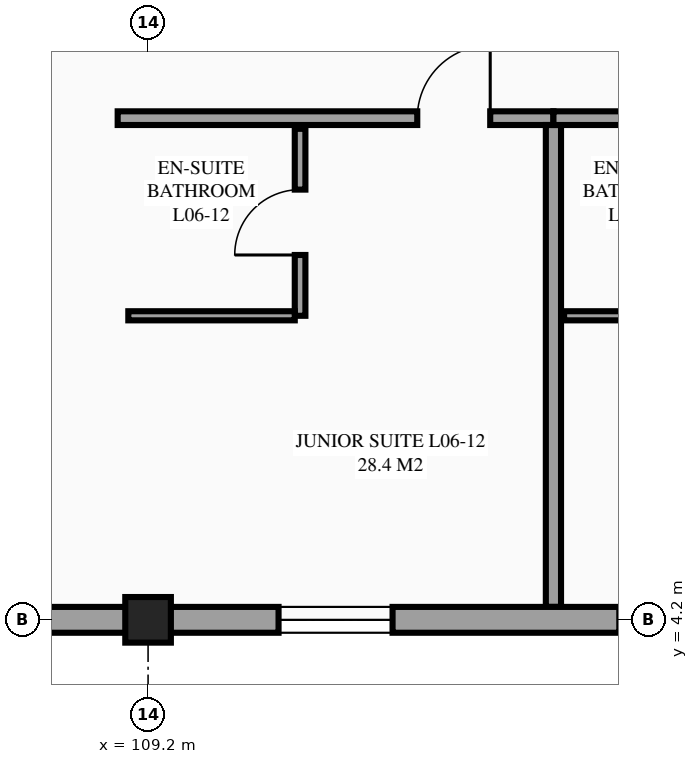
"""IFC4 building model, lengths in metres.
Left out: names, types, materials, properties, quantities, classifications, styles, units other than length and angle.
Written with IfcOpenShell. Run it as: python <this file> out.ifc"""

import sys

from ifc_helpers import new_model, si_unit, direction, frame, frame_2d, origin, origin_2d, place, context, subcontext, project, spatial, rectangle, extrude, element, fill, save


model = new_model("IFC4")
c1 = context("Model", 3, precision=1e-05, world=origin(), true_north=direction((0.0, 1.0)))
c2 = subcontext(c1, "Body", "Model", "MODEL_VIEW")
j1 = project(units=[si_unit("LENGTHUNIT", "METRE"), si_unit("PLANEANGLEUNIT", "RADIAN")], contexts=[c1])
p1 = place(None, origin())
s1 = spatial("IfcSite", under=j1, at=p1, CompositionType="ELEMENT")
p2 = place(p1, origin())
s2 = spatial("IfcBuilding", under=s1, at=p2, CompositionType="ELEMENT")
p3 = place(p2, frame((0.0, 0.0, 25.5)))
s3 = spatial("IfcBuildingStorey", under=s2, at=p3, CompositionType="ELEMENT", Elevation=25.5)
p4 = place(p3, frame((109.2, 4.2, 0.0), z_axis=(0.0, 0.0, 1.0), x_axis=(1.0, 0.0, 0.0)))
e1 = element("IfcColumn", 1, at=p4, inside=s3, PredefinedType="COLUMN", context=c2, shape_type="SweptSolid", body=[
    extrude(rectangle(XDim=0.6, YDim=0.6, at=origin_2d()), origin(), (0.0, 0.0, 1.0), 3.6),
])
p5 = place(p3, frame((108.8, 10.8, 0.0), z_axis=(0.0, 0.0, 1.0), x_axis=(1.0, 0.0, 0.0)))
e2 = element("IfcWall", 2, at=p5, inside=s3, PredefinedType="PARTITIONING", context=c2, shape_type="SweptSolid", body=[
    extrude(rectangle(XDim=5.733, YDim=0.18, at=frame_2d((2.867, 0.0))), origin(), (0.0, 0.0, 1.0), 3.375),
])
p6 = place(p5, frame((3.942, 0.0, 0.0)))
e3 = element("IfcOpeningElement", 3, at=p6, cuts=e2, PredefinedType="OPENING", context=c2, shape_type="SweptSolid", body=[
    extrude(rectangle(XDim=0.96, YDim=2.15, at=frame_2d((0.48, 1.075))), frame((0.0, 0.1, 0.0), z_axis=(0.0, -1.0, 0.0), x_axis=(1.0, 0.0, 0.0)), (0.0, 0.0, 1.0), 0.2),
])
p7 = place(p3, frame((114.533, 4.37, 0.0), z_axis=(0.0, 0.0, 1.0), x_axis=(0.0, 1.0, 0.0)))
e4 = element("IfcWall", 4, at=p7, inside=s3, PredefinedType="PARTITIONING", context=c2, shape_type="SweptSolid", body=[
    extrude(rectangle(XDim=6.34, YDim=0.2, at=frame_2d((3.17, 0.0))), origin(), (0.0, 0.0, 1.0), 3.375),
])
p8 = place(p3, frame((111.2, 8.2, 0.0), z_axis=(0.0, 0.0, 1.0), x_axis=(0.0, 1.0, 0.0)))
e5 = element("IfcWall", 5, at=p8, inside=s3, PredefinedType="PARTITIONING", context=c2, shape_type="SweptSolid", body=[
    extrude(rectangle(XDim=2.46, YDim=0.14, at=frame_2d((1.23, 0.0))), origin(), (0.0, 0.0, 1.0), 3.375),
])
p9 = place(p8, frame((0.8, 0.0, 0.0)))
e6 = element("IfcOpeningElement", 6, at=p9, cuts=e5, PredefinedType="OPENING", context=c2, shape_type="SweptSolid", body=[
    extrude(rectangle(XDim=0.86, YDim=2.1, at=frame_2d((0.43, 1.05))), frame((0.0, 0.08, 0.0), z_axis=(0.0, -1.0, 0.0), x_axis=(1.0, 0.0, 0.0)), (0.0, 0.0, 1.0), 0.16),
])
p10 = place(p3, frame((108.94, 8.2, 0.0), z_axis=(0.0, 0.0, 1.0), x_axis=(1.0, 0.0, 0.0)))
e7 = element("IfcWall", 7, at=p10, inside=s3, PredefinedType="PARTITIONING", context=c2, shape_type="SweptSolid", body=[
    extrude(rectangle(XDim=2.19, YDim=0.12, at=frame_2d((1.095, 0.0))), origin(), (0.0, 0.0, 1.0), 3.375),
])
p11 = place(p3, frame((114.533, 10.8, 0.0), z_axis=(0.0, 0.0, 1.0), x_axis=(1.0, 0.0, 0.0)))
e8 = element("IfcWall", 8, at=p11, inside=s3, PredefinedType="PARTITIONING", context=c2, shape_type="SweptSolid", body=[
    extrude(rectangle(XDim=5.733, YDim=0.18, at=frame_2d((2.867, 0.0))), origin(), (0.0, 0.0, 1.0), 3.375),
])
p12 = place(p11, frame((4.292, 0.0, 0.0)))
e9 = element("IfcOpeningElement", 9, at=p12, cuts=e8, PredefinedType="OPENING", context=c2, shape_type="SweptSolid", body=[
    extrude(rectangle(XDim=0.96, YDim=2.15, at=frame_2d((0.48, 1.075))), frame((0.0, 0.1, 0.0), z_axis=(0.0, -1.0, 0.0), x_axis=(1.0, 0.0, 0.0)), (0.0, 0.0, 1.0), 0.2),
])
p13 = place(p3, frame((114.673, 8.2, 0.0), z_axis=(0.0, 0.0, 1.0), x_axis=(1.0, 0.0, 0.0)))
e10 = element("IfcWall", 10, at=p13, inside=s3, PredefinedType="PARTITIONING", context=c2, shape_type="SweptSolid", body=[
    extrude(rectangle(XDim=2.19, YDim=0.12, at=frame_2d((1.095, 0.0))), origin(), (0.0, 0.0, 1.0), 3.375),
])
p14 = place(p3, frame((92.4, 4.2, 0.0), z_axis=(0.0, 0.0, 1.0), x_axis=(1.0, 0.0, 0.0)))
e11 = element("IfcWall", 11, at=p14, inside=s3, PredefinedType="STANDARD", context=c2, shape_type="SweptSolid", body=[
    extrude(rectangle(XDim=16.8, YDim=0.34, at=frame_2d((8.4, 0.0))), origin(), (0.0, 0.0, 1.0), 2.53),
])
p15 = place(p14, frame((5.36, 0.0, 0.85)))
e12 = element("IfcOpeningElement", 12, at=p15, cuts=e11, PredefinedType="OPENING", context=c2, shape_type="SweptSolid", body=[
    extrude(rectangle(XDim=1.5, YDim=1.5, at=frame_2d((0.75, 0.75))), frame((0.0, 0.18, 0.0), z_axis=(0.0, -1.0, 0.0), x_axis=(1.0, 0.0, 0.0)), (0.0, 0.0, 1.0), 0.36),
])
p16 = place(p3, frame((109.2, 4.2, 0.0), z_axis=(0.0, 0.0, 1.0), x_axis=(1.0, 0.0, 0.0)))
e13 = element("IfcWall", 13, at=p16, inside=s3, PredefinedType="STANDARD", context=c2, shape_type="SweptSolid", body=[
    extrude(rectangle(XDim=8.4, YDim=0.34, at=frame_2d((4.2, 0.0))), origin(), (0.0, 0.0, 1.0), 2.88),
])
p17 = place(p16, frame((1.717, 0.0, 0.85)))
e14 = element("IfcOpeningElement", 14, at=p17, cuts=e13, PredefinedType="OPENING", context=c2, shape_type="SweptSolid", body=[
    extrude(rectangle(XDim=1.5, YDim=1.5, at=frame_2d((0.75, 0.75))), frame((0.0, 0.18, 0.0), z_axis=(0.0, -1.0, 0.0), x_axis=(1.0, 0.0, 0.0)), (0.0, 0.0, 1.0), 0.36),
])
p18 = place(p16, frame((6.2, 0.0, 0.85)))
e15 = element("IfcOpeningElement", 15, at=p18, cuts=e13, PredefinedType="OPENING", context=c2, shape_type="SweptSolid", body=[
    extrude(rectangle(XDim=1.5, YDim=1.5, at=frame_2d((0.75, 0.75))), frame((0.0, 0.18, 0.0), z_axis=(0.0, -1.0, 0.0), x_axis=(1.0, 0.0, 0.0)), (0.0, 0.0, 1.0), 0.36),
])
p19 = place(p17, origin())
e16 = element("IfcWindow", 16, at=p19, inside=s3, PartitioningType="SINGLE_PANEL", PredefinedType="WINDOW", context=c2, shape_type="SweptSolid", body=[
    extrude(rectangle(XDim=1.5, YDim=1.5, at=frame_2d((0.75, 0.75))), frame((0.0, 0.03, 0.0), z_axis=(0.0, -1.0, 0.0), x_axis=(1.0, 0.0, 0.0)), (0.0, 0.0, 1.0), 0.06),
])
fill(e14, e16)
p20 = place(p6, origin())
e17 = element("IfcDoor", 17, at=p20, inside=s3, OperationType="SINGLE_SWING_RIGHT", PredefinedType="DOOR", context=c2, shape_type="SweptSolid", body=[
    extrude(rectangle(XDim=0.96, YDim=2.15, at=frame_2d((0.48, 1.075))), frame((0.0, 0.025, 0.0), z_axis=(0.0, -1.0, 0.0), x_axis=(1.0, 0.0, 0.0)), (0.0, 0.0, 1.0), 0.05),
])
fill(e3, e17)
p21 = place(p9, origin())
e18 = element("IfcDoor", 18, at=p21, inside=s3, OperationType="SINGLE_SWING_LEFT", PredefinedType="DOOR", context=c2, shape_type="SweptSolid", body=[
    extrude(rectangle(XDim=0.86, YDim=2.1, at=frame_2d((0.43, 1.05))), frame((0.0, 0.025, 0.0), z_axis=(0.0, -1.0, 0.0), x_axis=(1.0, 0.0, 0.0)), (0.0, 0.0, 1.0), 0.05),
])
fill(e6, e18)
save(model, sys.argv[1])
